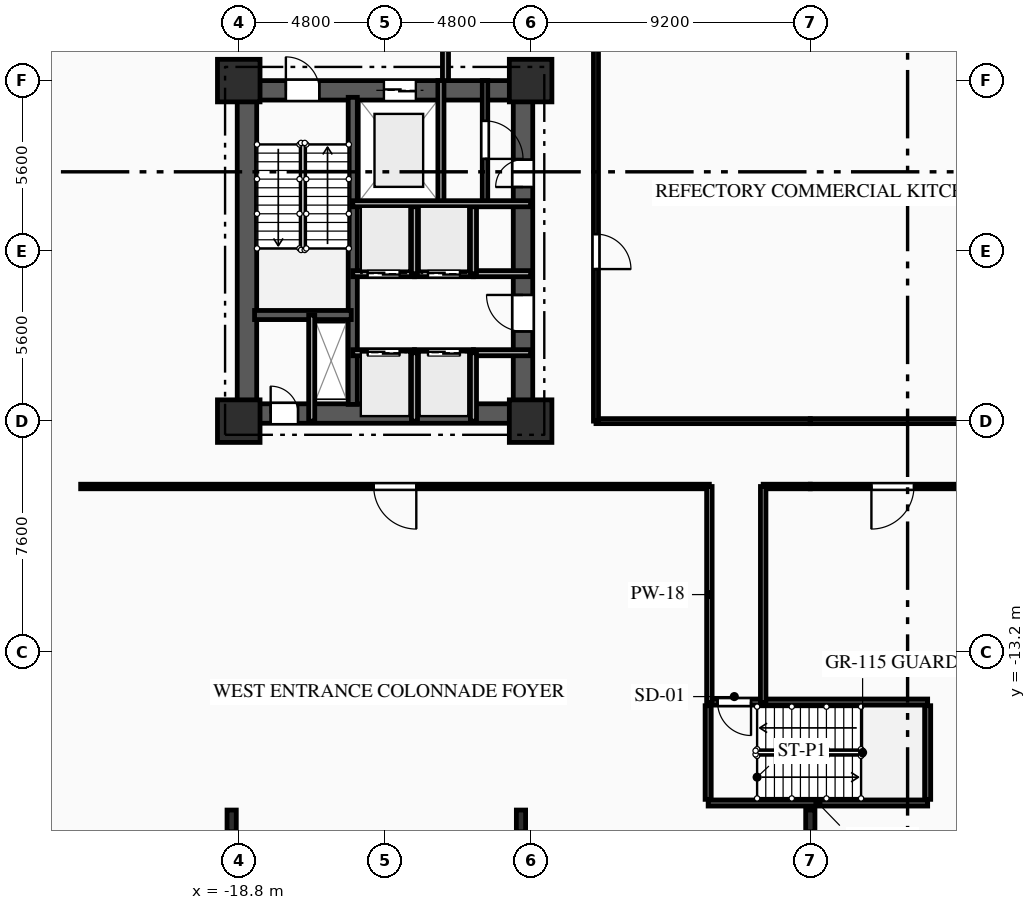
"""IFC4 building model, lengths in metres.
Left out: names, types, materials, properties, quantities, classifications, styles, units other than length and angle.
Written with IfcOpenShell. Run it as: python <this file> out.ifc"""

import sys

from ifc_helpers import new_model, si_unit, direction, frame, frame_2d, origin, origin_2d, place, context, subcontext, project, spatial, rectangle, i_section, extrude, element, fill, save


model = new_model("IFC4")
c1 = context("Model", 3, precision=1e-05, world=origin(), true_north=direction((0.0, 1.0)))
c2 = subcontext(c1, "Body", "Model", "MODEL_VIEW")
j1 = project(units=[si_unit("LENGTHUNIT", "METRE"), si_unit("PLANEANGLEUNIT", "RADIAN")], contexts=[c1])
p1 = place(None, origin())
s1 = spatial("IfcSite", under=j1, at=p1, CompositionType="ELEMENT")
p2 = place(p1, origin())
s2 = spatial("IfcBuilding", under=s1, at=p2, CompositionType="ELEMENT")
p3 = place(p2, origin())
s3 = spatial("IfcBuildingStorey", under=s2, at=p3, CompositionType="ELEMENT", Elevation=0.0)
for number, where, z_axis, x_axis in (
    (1, (-18.8, -5.6, 0.0), (0.0, 0.0, 1.0), (1.0, 0.0, 0.0)),
    (2, (-18.8, 5.6, 0.0), (0.0, 0.0, 1.0), (1.0, 0.0, 0.0)),
    (3, (-9.2, -5.6, 0.0), (0.0, 0.0, 1.0), (1.0, 0.0, 0.0)),
    (4, (-9.2, 5.6, 0.0), (0.0, 0.0, 1.0), (1.0, 0.0, 0.0)),
):
    element("IfcColumn", number, at=place(p3, frame(where, z_axis=z_axis, x_axis=x_axis)), inside=s3, PredefinedType="COLUMN", context=c2, shape_type="SweptSolid", body=[
        extrude(rectangle(XDim=1.4, YDim=1.4, at=origin_2d()), origin(), (0.0, 0.0, 1.0), 4.5),
    ])
for number, where, z_axis, x_axis in (
    (5, (-19.033, -18.75, 0.0), (0.0, 0.0, 1.0), (1.0, 0.0, 0.0)),
    (6, (-9.517, -18.75, 0.0), (0.0, 0.0, 1.0), (1.0, 0.0, 0.0)),
    (7, (0.0, -18.75, 0.0), (0.0, 0.0, 1.0), (1.0, 0.0, 0.0)),
):
    element("IfcColumn", number, at=place(p3, frame(where, z_axis=z_axis, x_axis=x_axis)), inside=s3, PredefinedType="COLUMN", context=c2, shape_type="SweptSolid", body=[
        extrude(i_section(OverallWidth=0.304, OverallDepth=0.716, WebThickness=0.021, FlangeThickness=0.04, FilletRadius=0.027, at=origin_2d()), origin(), (0.0, 0.0, 1.0), 4.5),
    ])
p4 = place(p3, frame((-18.8, 5.28, 0.0), z_axis=(0.0, 0.0, 1.0), x_axis=(1.0, 0.0, 0.0)))
e8 = element("IfcWall", 8, at=p4, inside=s3, PredefinedType="SHEAR", context=c2, shape_type="SweptSolid", body=[
    extrude(rectangle(XDim=9.6, YDim=0.64, at=frame_2d((4.8, 0.0))), origin(), (0.0, 0.0, 1.0), 4.17),
])
p5 = place(p4, frame((1.55, 0.0, 0.0)))
e9 = element("IfcOpeningElement", 9, at=p5, cuts=e8, PredefinedType="OPENING", context=c2, shape_type="SweptSolid", body=[
    extrude(rectangle(XDim=1.1, YDim=2.15, at=frame_2d((0.55, 1.075))), frame((0.0, 0.33, 0.0), z_axis=(0.0, -1.0, 0.0), x_axis=(1.0, 0.0, 0.0)), (0.0, 0.0, 1.0), 0.66),
])
p6 = place(p4, frame((4.775, 0.0, 0.0)))
e10 = element("IfcOpeningElement", 10, at=p6, cuts=e8, PredefinedType="OPENING", context=c2, shape_type="SweptSolid", body=[
    extrude(rectangle(XDim=1.05, YDim=2.1, at=frame_2d((0.525, 1.05))), frame((0.0, 0.33, 0.0), z_axis=(0.0, -1.0, 0.0), x_axis=(1.0, 0.0, 0.0)), (0.0, 0.0, 1.0), 0.66),
])
p7 = place(p3, frame((-18.8, -5.35, 0.0), z_axis=(0.0, 0.0, 1.0), x_axis=(1.0, 0.0, 0.0)))
e11 = element("IfcWall", 11, at=p7, inside=s3, PredefinedType="SHEAR", context=c2, shape_type="SweptSolid", body=[
    extrude(rectangle(XDim=9.6, YDim=0.64, at=frame_2d((4.8, 0.0))), origin(), (0.0, 0.0, 1.0), 4.17),
])
p8 = place(p7, frame((1.05, 0.0, 0.0)))
e12 = element("IfcOpeningElement", 12, at=p8, cuts=e11, PredefinedType="OPENING", context=c2, shape_type="SweptSolid", body=[
    extrude(rectangle(XDim=0.9, YDim=2.1, at=frame_2d((0.45, 1.05))), frame((0.0, 0.33, 0.0), z_axis=(0.0, -1.0, 0.0), x_axis=(1.0, 0.0, 0.0)), (0.0, 0.0, 1.0), 0.66),
])
p9 = place(p3, frame((-18.53, -5.05, 0.0), z_axis=(0.0, 0.0, 1.0), x_axis=(0.0, 1.0, 0.0)))
e13 = element("IfcWall", 13, at=p9, inside=s3, PredefinedType="SHEAR", context=c2, shape_type="SweptSolid", body=[
    extrude(rectangle(XDim=10.1, YDim=0.64, at=frame_2d((5.05, 0.0))), origin(), (0.0, 0.0, 1.0), 4.17),
])
p10 = place(p3, frame((-9.45, -5.05, 0.0), z_axis=(0.0, 0.0, 1.0), x_axis=(0.0, 1.0, 0.0)))
e14 = element("IfcWall", 14, at=p10, inside=s3, PredefinedType="SHEAR", context=c2, shape_type="SweptSolid", body=[
    extrude(rectangle(XDim=10.1, YDim=0.64, at=frame_2d((5.05, 0.0))), origin(), (0.0, 0.0, 1.0), 4.17),
])
p11 = place(p10, frame((7.15, 0.0, 0.0)))
e15 = element("IfcOpeningElement", 15, at=p11, cuts=e14, PredefinedType="OPENING", context=c2, shape_type="SweptSolid", body=[
    extrude(rectangle(XDim=0.9, YDim=2.1, at=frame_2d((0.45, 1.05))), frame((0.0, 0.33, 0.0), z_axis=(0.0, -1.0, 0.0), x_axis=(1.0, 0.0, 0.0)), (0.0, 0.0, 1.0), 0.66),
])
p12 = place(p10, frame((2.4, 0.0, 0.0)))
e16 = element("IfcOpeningElement", 16, at=p12, cuts=e14, PredefinedType="OPENING", context=c2, shape_type="SweptSolid", body=[
    extrude(rectangle(XDim=1.2, YDim=2.15, at=frame_2d((0.6, 1.075))), frame((0.0, 0.33, 0.0), z_axis=(0.0, -1.0, 0.0), x_axis=(1.0, 0.0, 0.0)), (0.0, 0.0, 1.0), 0.66),
])
p13 = place(p3, frame((-15.05, -5.05, 0.0), z_axis=(0.0, 0.0, 1.0), x_axis=(0.0, 1.0, 0.0)))
e17 = element("IfcWall", 17, at=p13, inside=s3, PredefinedType="SHEAR", context=c2, shape_type="SweptSolid", body=[
    extrude(rectangle(XDim=10.1, YDim=0.3, at=frame_2d((5.05, 0.0))), origin(), (0.0, 0.0, 1.0), 4.17),
])
p14 = place(p3, frame((-18.28, -2.11, 0.0), z_axis=(0.0, 0.0, 1.0), x_axis=(1.0, 0.0, 0.0)))
e18 = element("IfcWall", 18, at=p14, inside=s3, PredefinedType="SHEAR", context=c2, shape_type="SweptSolid", body=[
    extrude(rectangle(XDim=3.18, YDim=0.3, at=frame_2d((1.59, 0.0))), origin(), (0.0, 0.0, 1.0), 4.17),
])
p15 = place(p3, frame((3.86, -14.84, 0.0), z_axis=(0.0, 0.0, 1.0), x_axis=(-1.0, 0.0, 0.0)))
e19 = element("IfcWall", 19, at=p15, inside=s3, PredefinedType="SHEAR", context=c2, shape_type="SweptSolid", body=[
    extrude(rectangle(XDim=7.22, YDim=0.2, at=frame_2d((3.61, 0.0))), origin(), (0.0, 0.0, 1.0), 4.17),
])
p16 = place(p15, frame((5.81, 0.0, 0.0)))
e20 = element("IfcOpeningElement", 20, at=p16, cuts=e19, PredefinedType="OPENING", context=c2, shape_type="SweptSolid", body=[
    extrude(rectangle(XDim=1.1, YDim=2.15, at=frame_2d((0.55, 1.075))), frame((0.0, 0.11, 0.0), z_axis=(0.0, -1.0, 0.0), x_axis=(1.0, 0.0, 0.0)), (0.0, 0.0, 1.0), 0.22),
])
p17 = place(p3, frame((-3.36, -18.16, 0.0), z_axis=(0.0, 0.0, 1.0), x_axis=(1.0, 0.0, 0.0)))
e21 = element("IfcWall", 21, at=p17, inside=s3, PredefinedType="SHEAR", context=c2, shape_type="SweptSolid", body=[
    extrude(rectangle(XDim=7.22, YDim=0.2, at=frame_2d((3.61, 0.0))), origin(), (0.0, 0.0, 1.0), 4.17),
])
for number, where, z_axis, x_axis in (
    (22, (-3.36, -18.04, 0.0), (0.0, 0.0, 1.0), (0.0, 1.0, 0.0)),
    (23, (3.86, -18.04, 0.0), (0.0, 0.0, 1.0), (0.0, 1.0, 0.0)),
):
    element("IfcWall", number, at=place(p3, frame(where, z_axis=z_axis, x_axis=x_axis)), inside=s3, PredefinedType="SHEAR", context=c2, shape_type="SweptSolid", body=[
        extrude(rectangle(XDim=3.08, YDim=0.2, at=frame_2d((1.54, 0.0))), origin(), (0.0, 0.0, 1.0), 4.17),
    ])
p18 = place(p3, frame((-16.4, -5.6, 0.0), z_axis=(0.0, 0.0, 1.0), x_axis=(0.0, 1.0, 0.0)))
e24 = element("IfcWall", 24, at=p18, inside=s3, PredefinedType="PARTITIONING", context=c2, shape_type="SweptSolid", body=[
    extrude(rectangle(XDim=3.49, YDim=0.2, at=frame_2d((1.745, 0.0))), origin(), (0.0, 0.0, 1.0), 4.17),
])
p19 = place(p3, frame((-12.15, 1.55, 0.0), z_axis=(0.0, 0.0, 1.0), x_axis=(0.0, 1.0, 0.0)))
e25 = element("IfcWall", 25, at=p19, inside=s3, PredefinedType="PARTITIONING", context=c2, shape_type="SweptSolid", body=[
    extrude(rectangle(XDim=4.05, YDim=0.2, at=frame_2d((2.025, 0.0))), origin(), (0.0, 0.0, 1.0), 4.17),
])
p20 = place(p3, frame((-12.0, 5.6, 0.0), z_axis=(0.0, 0.0, 1.0), x_axis=(0.0, 1.0, 0.0)))
e26 = element("IfcWall", 26, at=p20, inside=s3, PredefinedType="PARTITIONING", context=c2, shape_type="SweptSolid", body=[
    extrude(rectangle(XDim=2.9, YDim=0.2, at=frame_2d((1.45, 0.0))), origin(), (0.0, 0.0, 1.0), 4.17),
])
p21 = place(p3, frame((-10.7, 5.6, 0.0), z_axis=(0.0, 0.0, 1.0), x_axis=(0.0, -1.0, 0.0)))
e27 = element("IfcWall", 27, at=p21, inside=s3, PredefinedType="PARTITIONING", context=c2, shape_type="SweptSolid", body=[
    extrude(rectangle(XDim=4.05, YDim=0.18, at=frame_2d((2.025, 0.0))), origin(), (0.0, 0.0, 1.0), 4.17),
])
p22 = place(p21, frame((1.325, 0.0, 0.0)))
e28 = element("IfcOpeningElement", 28, at=p22, cuts=e27, PredefinedType="OPENING", context=c2, shape_type="SweptSolid", body=[
    extrude(rectangle(XDim=1.25, YDim=2.2, at=frame_2d((0.625, 1.1))), frame((0.0, 0.1, 0.0), z_axis=(0.0, -1.0, 0.0), x_axis=(1.0, 0.0, 0.0)), (0.0, 0.0, 1.0), 0.2),
])
p23 = place(p3, frame((-15.05, -3.35, 0.0), z_axis=(0.0, 0.0, 1.0), x_axis=(1.0, 0.0, 0.0)))
e29 = element("IfcWall", 29, at=p23, inside=s3, PredefinedType="PARTITIONING", context=c2, shape_type="SweptSolid", body=[
    extrude(rectangle(XDim=2.03, YDim=0.2, at=frame_2d((1.015, 0.0))), origin(), (0.0, 0.0, 1.0), 4.17),
])
p24 = place(p23, frame((0.49, 0.0, 0.0)))
e30 = element("IfcOpeningElement", 30, at=p24, cuts=e29, PredefinedType="OPENING", context=c2, shape_type="SweptSolid", body=[
    extrude(rectangle(XDim=1.05, YDim=2.1, at=frame_2d((0.525, 1.05))), frame((0.0, 0.11, 0.0), z_axis=(0.0, -1.0, 0.0), x_axis=(1.0, 0.0, 0.0)), (0.0, 0.0, 1.0), 0.22),
])
p25 = place(p3, frame((-13.02, -3.35, 0.0), z_axis=(0.0, 0.0, 1.0), x_axis=(1.0, 0.0, 0.0)))
e31 = element("IfcWall", 31, at=p25, inside=s3, PredefinedType="PARTITIONING", context=c2, shape_type="SweptSolid", body=[
    extrude(rectangle(XDim=1.94, YDim=0.2, at=frame_2d((0.97, 0.0))), origin(), (0.0, 0.0, 1.0), 4.17),
])
p26 = place(p25, frame((0.445, 0.0, 0.0)))
e32 = element("IfcOpeningElement", 32, at=p26, cuts=e31, PredefinedType="OPENING", context=c2, shape_type="SweptSolid", body=[
    extrude(rectangle(XDim=1.05, YDim=2.1, at=frame_2d((0.525, 1.05))), frame((0.0, 0.11, 0.0), z_axis=(0.0, -1.0, 0.0), x_axis=(1.0, 0.0, 0.0)), (0.0, 0.0, 1.0), 0.22),
])
p27 = place(p3, frame((-11.08, -3.35, 0.0), z_axis=(0.0, 0.0, 1.0), x_axis=(1.0, 0.0, 0.0)))
e33 = element("IfcWall", 33, at=p27, inside=s3, PredefinedType="PARTITIONING", context=c2, shape_type="SweptSolid", body=[
    extrude(rectangle(XDim=1.88, YDim=0.2, at=frame_2d((0.94, 0.0))), origin(), (0.0, 0.0, 1.0), 3.885),
])
p28 = place(p3, frame((-13.02, -0.75, 0.0), z_axis=(0.0, 0.0, 1.0), x_axis=(-1.0, 0.0, 0.0)))
e34 = element("IfcWall", 34, at=p28, inside=s3, PredefinedType="PARTITIONING", context=c2, shape_type="SweptSolid", body=[
    extrude(rectangle(XDim=2.03, YDim=0.2, at=frame_2d((1.015, 0.0))), origin(), (0.0, 0.0, 1.0), 4.17),
])
p29 = place(p28, frame((0.49, 0.0, 0.0)))
e35 = element("IfcOpeningElement", 35, at=p29, cuts=e34, PredefinedType="OPENING", context=c2, shape_type="SweptSolid", body=[
    extrude(rectangle(XDim=1.05, YDim=2.1, at=frame_2d((0.525, 1.05))), frame((0.0, 0.11, 0.0), z_axis=(0.0, -1.0, 0.0), x_axis=(1.0, 0.0, 0.0)), (0.0, 0.0, 1.0), 0.22),
])
p30 = place(p3, frame((-11.08, -0.75, 0.0), z_axis=(0.0, 0.0, 1.0), x_axis=(-1.0, 0.0, 0.0)))
e36 = element("IfcWall", 36, at=p30, inside=s3, PredefinedType="PARTITIONING", context=c2, shape_type="SweptSolid", body=[
    extrude(rectangle(XDim=1.94, YDim=0.2, at=frame_2d((0.97, 0.0))), origin(), (0.0, 0.0, 1.0), 4.17),
])
p31 = place(p30, frame((0.445, 0.0, 0.0)))
e37 = element("IfcOpeningElement", 37, at=p31, cuts=e36, PredefinedType="OPENING", context=c2, shape_type="SweptSolid", body=[
    extrude(rectangle(XDim=1.05, YDim=2.1, at=frame_2d((0.525, 1.05))), frame((0.0, 0.11, 0.0), z_axis=(0.0, -1.0, 0.0), x_axis=(1.0, 0.0, 0.0)), (0.0, 0.0, 1.0), 0.22),
])
p32 = place(p3, frame((-9.2, -0.75, 0.0), z_axis=(0.0, 0.0, 1.0), x_axis=(-1.0, 0.0, 0.0)))
e38 = element("IfcWall", 38, at=p32, inside=s3, PredefinedType="PARTITIONING", context=c2, shape_type="SweptSolid", body=[
    extrude(rectangle(XDim=1.88, YDim=0.2, at=frame_2d((0.94, 0.0))), origin(), (0.0, 0.0, 1.0), 4.17),
])
for number, where, z_axis, x_axis in (
    (39, (-13.02, -5.6, 0.0), (0.0, 0.0, 1.0), (0.0, 1.0, 0.0)),
    (40, (-11.08, -5.6, 0.0), (0.0, 0.0, 1.0), (0.0, 1.0, 0.0)),
):
    element("IfcWall", number, at=place(p3, frame(where, z_axis=z_axis, x_axis=x_axis)), inside=s3, PredefinedType="PARTITIONING", context=c2, shape_type="SweptSolid", body=[
        extrude(rectangle(XDim=2.25, YDim=0.2, at=frame_2d((1.125, 0.0))), origin(), (0.0, 0.0, 1.0), 4.17),
    ])
for number, where, z_axis, x_axis in (
    (41, (-13.02, -0.75, 0.0), (0.0, 0.0, 1.0), (0.0, 1.0, 0.0)),
    (42, (-11.08, -0.75, 0.0), (0.0, 0.0, 1.0), (0.0, 1.0, 0.0)),
):
    element("IfcWall", number, at=place(p3, frame(where, z_axis=z_axis, x_axis=x_axis)), inside=s3, PredefinedType="PARTITIONING", context=c2, shape_type="SweptSolid", body=[
        extrude(rectangle(XDim=2.3, YDim=0.2, at=frame_2d((1.15, 0.0))), origin(), (0.0, 0.0, 1.0), 4.17),
    ])
p33 = place(p3, frame((-3.32, -7.75, 0.0), z_axis=(0.0, 0.0, 1.0), x_axis=(-1.0, 0.0, 0.0)))
e43 = element("IfcWall", 43, at=p33, inside=s3, PredefinedType="PARTITIONING", context=c2, shape_type="SweptSolid", body=[
    extrude(rectangle(XDim=20.68, YDim=0.15, at=frame_2d((10.34, 0.0))), origin(), (0.0, 0.0, 1.0), 4.17),
])
p34 = place(p33, frame((9.64, 0.0, 0.0)))
e44 = element("IfcOpeningElement", 44, at=p34, cuts=e43, PredefinedType="OPENING", context=c2, shape_type="SweptSolid", body=[
    extrude(rectangle(XDim=1.4, YDim=2.3, at=frame_2d((0.7, 1.15))), frame((0.0, 0.085, 0.0), z_axis=(0.0, -1.0, 0.0), x_axis=(1.0, 0.0, 0.0)), (0.0, 0.0, 1.0), 0.17),
])
p35 = place(p3, frame((0.0, -7.75, 0.0), z_axis=(0.0, 0.0, 1.0), x_axis=(-1.0, 0.0, 0.0)))
e45 = element("IfcWall", 45, at=p35, inside=s3, PredefinedType="PARTITIONING", context=c2, shape_type="SweptSolid", body=[
    extrude(rectangle(XDim=1.55, YDim=0.15, at=frame_2d((0.775, 0.0))), origin(), (0.0, 0.0, 1.0), 4.17),
])
p36 = place(p3, frame((-7.05, -5.6, 0.0), z_axis=(0.0, 0.0, 1.0), x_axis=(1.0, 0.0, 0.0)))
e46 = element("IfcWall", 46, at=p36, inside=s3, PredefinedType="PARTITIONING", context=c2, shape_type="SweptSolid", body=[
    extrude(rectangle(XDim=7.05, YDim=0.165, at=frame_2d((3.525, 0.0))), origin(), (0.0, 0.0, 1.0), 3.655),
])
p37 = place(p3, frame((14.0, -7.75, 0.0), z_axis=(0.0, 0.0, 1.0), x_axis=(-1.0, 0.0, 0.0)))
e47 = element("IfcWall", 47, at=p37, inside=s3, PredefinedType="PARTITIONING", context=c2, shape_type="SweptSolid", body=[
    extrude(rectangle(XDim=14.0, YDim=0.15, at=frame_2d((7.0, 0.0))), origin(), (0.0, 0.0, 1.0), 4.17),
])
p38 = place(p37, frame((10.59, 0.0, 0.0)))
e48 = element("IfcOpeningElement", 48, at=p38, cuts=e47, PredefinedType="OPENING", context=c2, shape_type="SweptSolid", body=[
    extrude(rectangle(XDim=1.4, YDim=2.3, at=frame_2d((0.7, 1.15))), frame((0.0, 0.085, 0.0), z_axis=(0.0, -1.0, 0.0), x_axis=(1.0, 0.0, 0.0)), (0.0, 0.0, 1.0), 0.17),
])
p39 = place(p3, frame((0.0, -5.6, 0.0), z_axis=(0.0, 0.0, 1.0), x_axis=(1.0, 0.0, 0.0)))
e49 = element("IfcWall", 49, at=p39, inside=s3, PredefinedType="PARTITIONING", context=c2, shape_type="SweptSolid", body=[
    extrude(rectangle(XDim=7.05, YDim=0.165, at=frame_2d((3.525, 0.0))), origin(), (0.0, 0.0, 1.0), 3.655),
])
p40 = place(p3, frame((-7.05, 8.5, 0.0), z_axis=(0.0, 0.0, 1.0), x_axis=(0.0, -1.0, 0.0)))
e50 = element("IfcWall", 50, at=p40, inside=s3, PredefinedType="PARTITIONING", context=c2, shape_type="SweptSolid", body=[
    extrude(rectangle(XDim=14.1, YDim=0.165, at=frame_2d((7.05, 0.0))), origin(), (0.0, 0.0, 1.0), 4.17),
])
p41 = place(p40, frame((7.949, 0.0, 0.0)))
e51 = element("IfcOpeningElement", 51, at=p41, cuts=e50, PredefinedType="OPENING", context=c2, shape_type="SweptSolid", body=[
    extrude(rectangle(XDim=1.15, YDim=2.15, at=frame_2d((0.575, 1.075))), frame((0.0, 0.093, 0.0), z_axis=(0.0, -1.0, 0.0), x_axis=(1.0, 0.0, 0.0)), (0.0, 0.0, 1.0), 0.185),
])
for number, where, z_axis, x_axis in (
    (52, (-3.32, -14.86, 0.0), (0.0, 0.0, 1.0), (0.0, 1.0, 0.0)),
    (53, (-1.55, -7.75, 0.0), (0.0, 0.0, 1.0), (0.0, -1.0, 0.0)),
):
    element("IfcWall", number, at=place(p3, frame(where, z_axis=z_axis, x_axis=x_axis)), inside=s3, PredefinedType="PARTITIONING", context=c2, shape_type="SweptSolid", body=[
        extrude(rectangle(XDim=7.11, YDim=0.18, at=frame_2d((3.555, 0.0))), origin(), (0.0, 0.0, 1.0), 4.17),
    ])
p42 = place(p3, frame((-15.05, 1.55, 0.0), z_axis=(0.0, 0.0, 1.0), x_axis=(1.0, 0.0, 0.0)))
e54 = element("IfcWall", 54, at=p42, inside=s3, PredefinedType="PARTITIONING", context=c2, shape_type="SweptSolid", body=[
    extrude(rectangle(XDim=5.85, YDim=0.2, at=frame_2d((2.925, 0.0))), origin(), (0.0, 0.0, 1.0), 4.17),
])
p43 = place(p5, origin())
e55 = element("IfcDoor", 55, at=p43, inside=s3, OperationType="SINGLE_SWING_LEFT", PredefinedType="DOOR", context=c2, shape_type="SweptSolid", body=[
    extrude(rectangle(XDim=1.1, YDim=2.15, at=frame_2d((0.55, 1.075))), frame((0.0, 0.025, 0.0), z_axis=(0.0, -1.0, 0.0), x_axis=(1.0, 0.0, 0.0)), (0.0, 0.0, 1.0), 0.05),
])
fill(e9, e55)
p44 = place(p6, origin())
e56 = element("IfcDoor", 56, at=p44, inside=s3, OperationType="DOUBLE_DOOR_SLIDING", PredefinedType="DOOR", context=c2, shape_type="SweptSolid", body=[
    extrude(rectangle(XDim=1.05, YDim=2.1, at=frame_2d((0.525, 1.05))), frame((0.0, 0.025, 0.0), z_axis=(0.0, -1.0, 0.0), x_axis=(1.0, 0.0, 0.0)), (0.0, 0.0, 1.0), 0.05),
])
fill(e10, e56)
p45 = place(p8, origin())
e57 = element("IfcDoor", 57, at=p45, inside=s3, OperationType="SINGLE_SWING_LEFT", PredefinedType="DOOR", context=c2, shape_type="SweptSolid", body=[
    extrude(rectangle(XDim=0.9, YDim=2.1, at=frame_2d((0.45, 1.05))), frame((0.0, 0.025, 0.0), z_axis=(0.0, -1.0, 0.0), x_axis=(1.0, 0.0, 0.0)), (0.0, 0.0, 1.0), 0.05),
])
fill(e12, e57)
p46 = place(p16, origin())
e58 = element("IfcDoor", 58, at=p46, inside=s3, OperationType="SINGLE_SWING_LEFT", PredefinedType="DOOR", context=c2, shape_type="SweptSolid", body=[
    extrude(rectangle(XDim=1.1, YDim=2.15, at=frame_2d((0.55, 1.075))), frame((0.0, 0.025, 0.0), z_axis=(0.0, -1.0, 0.0), x_axis=(1.0, 0.0, 0.0)), (0.0, 0.0, 1.0), 0.05),
])
fill(e20, e58)
p47 = place(p22, origin())
e59 = element("IfcDoor", 59, at=p47, inside=s3, OperationType="SINGLE_SWING_RIGHT", PredefinedType="DOOR", context=c2, shape_type="SweptSolid", body=[
    extrude(rectangle(XDim=1.25, YDim=2.2, at=frame_2d((0.625, 1.1))), frame((0.0, 0.025, 0.0), z_axis=(0.0, -1.0, 0.0), x_axis=(1.0, 0.0, 0.0)), (0.0, 0.0, 1.0), 0.05),
])
fill(e28, e59)
p48 = place(p11, origin())
e60 = element("IfcDoor", 60, at=p48, inside=s3, OperationType="SINGLE_SWING_LEFT", PredefinedType="DOOR", context=c2, shape_type="SweptSolid", body=[
    extrude(rectangle(XDim=0.9, YDim=2.1, at=frame_2d((0.45, 1.05))), frame((0.0, 0.025, 0.0), z_axis=(0.0, -1.0, 0.0), x_axis=(1.0, 0.0, 0.0)), (0.0, 0.0, 1.0), 0.05),
])
fill(e15, e60)
p49 = place(p24, origin())
e61 = element("IfcDoor", 61, at=p49, inside=s3, OperationType="DOUBLE_DOOR_SLIDING", PredefinedType="DOOR", context=c2, shape_type="SweptSolid", body=[
    extrude(rectangle(XDim=1.05, YDim=2.1, at=frame_2d((0.525, 1.05))), frame((0.0, 0.025, 0.0), z_axis=(0.0, -1.0, 0.0), x_axis=(1.0, 0.0, 0.0)), (0.0, 0.0, 1.0), 0.05),
])
fill(e30, e61)
p50 = place(p26, origin())
e62 = element("IfcDoor", 62, at=p50, inside=s3, OperationType="DOUBLE_DOOR_SLIDING", PredefinedType="DOOR", context=c2, shape_type="SweptSolid", body=[
    extrude(rectangle(XDim=1.05, YDim=2.1, at=frame_2d((0.525, 1.05))), frame((0.0, 0.025, 0.0), z_axis=(0.0, -1.0, 0.0), x_axis=(1.0, 0.0, 0.0)), (0.0, 0.0, 1.0), 0.05),
])
fill(e32, e62)
p51 = place(p29, origin())
e63 = element("IfcDoor", 63, at=p51, inside=s3, OperationType="DOUBLE_DOOR_SLIDING", PredefinedType="DOOR", context=c2, shape_type="SweptSolid", body=[
    extrude(rectangle(XDim=1.05, YDim=2.1, at=frame_2d((0.525, 1.05))), frame((0.0, 0.025, 0.0), z_axis=(0.0, -1.0, 0.0), x_axis=(1.0, 0.0, 0.0)), (0.0, 0.0, 1.0), 0.05),
])
fill(e35, e63)
p52 = place(p31, origin())
e64 = element("IfcDoor", 64, at=p52, inside=s3, OperationType="DOUBLE_DOOR_SLIDING", PredefinedType="DOOR", context=c2, shape_type="SweptSolid", body=[
    extrude(rectangle(XDim=1.05, YDim=2.1, at=frame_2d((0.525, 1.05))), frame((0.0, 0.025, 0.0), z_axis=(0.0, -1.0, 0.0), x_axis=(1.0, 0.0, 0.0)), (0.0, 0.0, 1.0), 0.05),
])
fill(e37, e64)
p53 = place(p12, origin())
e65 = element("IfcDoor", 65, at=p53, inside=s3, OperationType="SINGLE_SWING_RIGHT", PredefinedType="DOOR", context=c2, shape_type="SweptSolid", body=[
    extrude(rectangle(XDim=1.2, YDim=2.15, at=frame_2d((0.6, 1.075))), frame((0.0, 0.025, 0.0), z_axis=(0.0, -1.0, 0.0), x_axis=(1.0, 0.0, 0.0)), (0.0, 0.0, 1.0), 0.05),
])
fill(e16, e65)
p54 = place(p34, origin())
e66 = element("IfcDoor", 66, at=p54, inside=s3, OperationType="SINGLE_SWING_LEFT", PredefinedType="DOOR", context=c2, shape_type="SweptSolid", body=[
    extrude(rectangle(XDim=1.4, YDim=2.3, at=frame_2d((0.7, 1.15))), frame((0.0, 0.025, 0.0), z_axis=(0.0, -1.0, 0.0), x_axis=(1.0, 0.0, 0.0)), (0.0, 0.0, 1.0), 0.05),
])
fill(e44, e66)
p55 = place(p38, origin())
e67 = element("IfcDoor", 67, at=p55, inside=s3, OperationType="SINGLE_SWING_RIGHT", PredefinedType="DOOR", context=c2, shape_type="SweptSolid", body=[
    extrude(rectangle(XDim=1.4, YDim=2.3, at=frame_2d((0.7, 1.15))), frame((0.0, 0.025, 0.0), z_axis=(0.0, -1.0, 0.0), x_axis=(1.0, 0.0, 0.0)), (0.0, 0.0, 1.0), 0.05),
])
fill(e48, e67)
p56 = place(p41, origin())
e68 = element("IfcDoor", 68, at=p56, inside=s3, OperationType="SINGLE_SWING_RIGHT", PredefinedType="DOOR", context=c2, shape_type="SweptSolid", body=[
    extrude(rectangle(XDim=1.15, YDim=2.15, at=frame_2d((0.575, 1.075))), frame((0.0, 0.025, 0.0), z_axis=(0.0, -1.0, 0.0), x_axis=(1.0, 0.0, 0.0)), (0.0, 0.0, 1.0), 0.05),
])
fill(e51, e68)
save(model, sys.argv[1])
